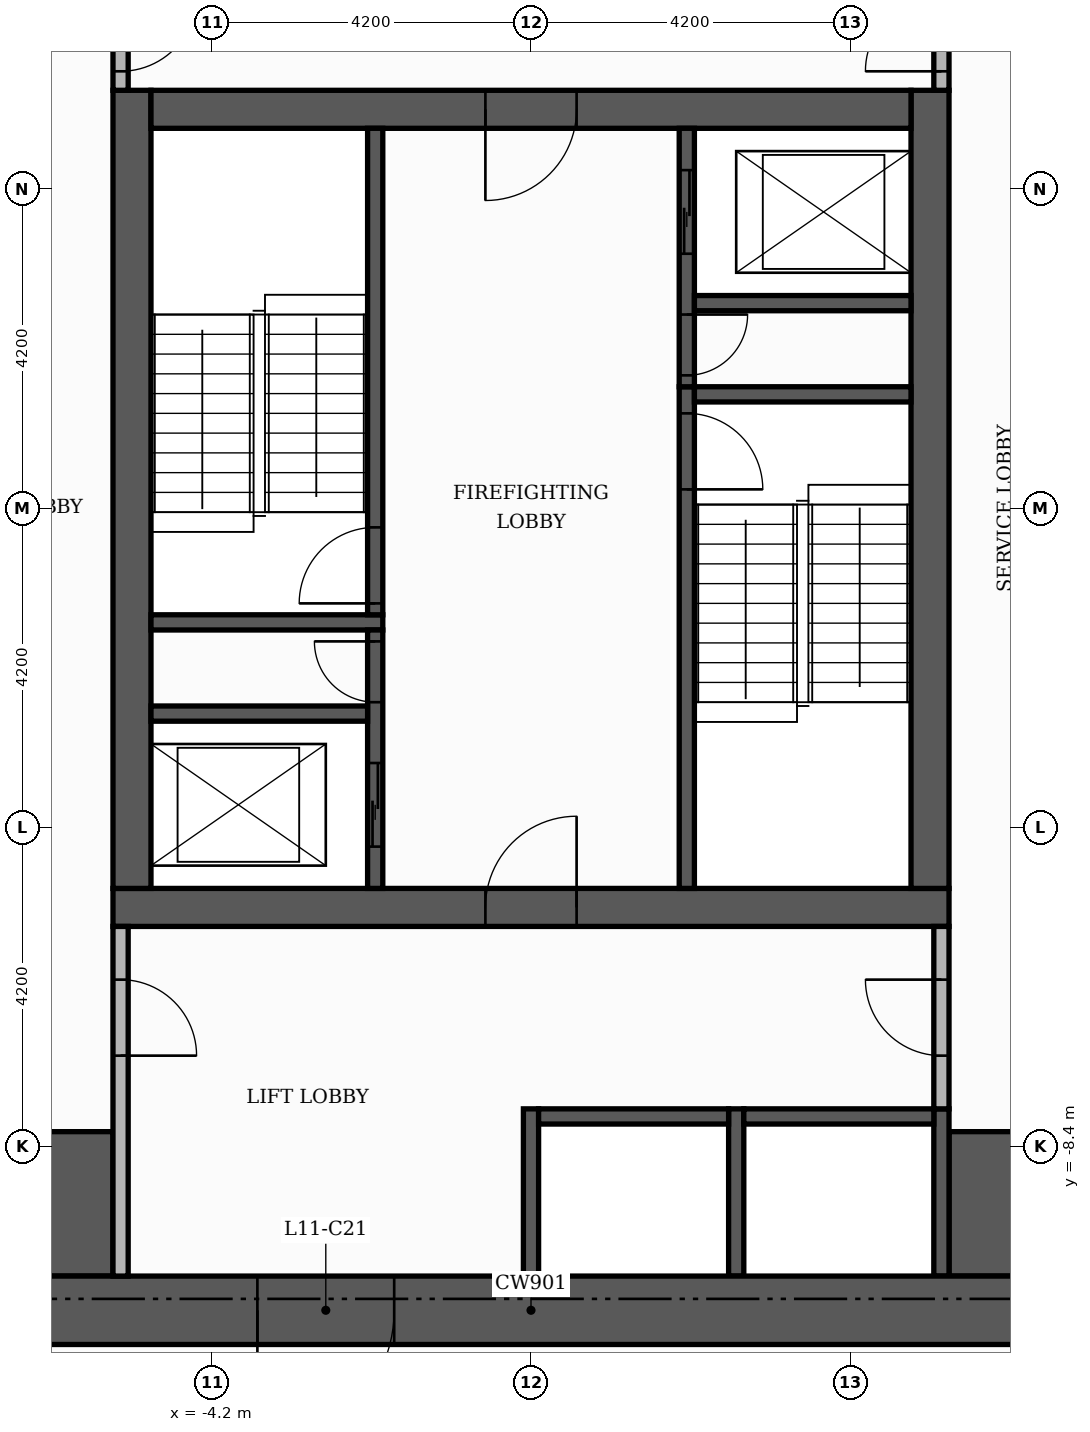
"""IFC4 building model, lengths in metres.
Left out: names, types, materials, properties, quantities, classifications, styles, units other than length and angle.
Written with IfcOpenShell. Run it as: python <this file> out.ifc"""

import sys

from ifc_helpers import new_model, si_unit, direction, frame, frame_2d, origin, place, context, subcontext, project, spatial, rectangle, extrude, element, fill, save


model = new_model("IFC4")
c1 = context("Model", 3, precision=1e-05, world=origin(), true_north=direction((0.0, 1.0)))
c2 = subcontext(c1, "Body", "Model", "MODEL_VIEW")
j1 = project(units=[si_unit("LENGTHUNIT", "METRE"), si_unit("PLANEANGLEUNIT", "RADIAN")], contexts=[c1])
p1 = place(None, origin())
s1 = spatial("IfcSite", under=j1, at=p1, CompositionType="ELEMENT")
p2 = place(p1, origin())
s2 = spatial("IfcBuilding", under=s1, at=p2, CompositionType="ELEMENT")
p3 = place(p2, frame((0.0, 0.0, 50.4)))
s3 = spatial("IfcBuildingStorey", under=s2, at=p3, CompositionType="ELEMENT", Elevation=50.4)
p4 = place(p3, frame((-5.5, -5.25, 0.0), z_axis=(0.0, 0.0, 1.0), x_axis=(1.0, 0.0, 0.0)))
e1 = element("IfcWall", 1, at=p4, inside=s3, PredefinedType="SHEAR", context=c2, shape_type="SweptSolid", body=[
    extrude(rectangle(XDim=11.0, YDim=0.5, at=frame_2d((5.5, 0.0))), origin(), (0.0, 0.0, 1.0), 3.48),
])
p5 = place(p4, frame((4.9, 0.0, 0.0)))
e2 = element("IfcOpeningElement", 2, at=p5, cuts=e1, PredefinedType="OPENING", context=c2, shape_type="SweptSolid", body=[
    extrude(rectangle(XDim=1.2, YDim=2.1, at=frame_2d((0.6, 1.05))), frame((0.0, 0.26, 0.0), z_axis=(0.0, -1.0, 0.0), x_axis=(1.0, 0.0, 0.0)), (0.0, 0.0, 1.0), 0.52),
])
for number, where, z_axis, x_axis in (
    (3, (-5.25, -5.0, 0.0), (0.0, 0.0, 1.0), (0.0, 1.0, 0.0)),
    (4, (5.25, -5.0, 0.0), (0.0, 0.0, 1.0), (0.0, 1.0, 0.0)),
):
    element("IfcWall", number, at=place(p3, frame(where, z_axis=z_axis, x_axis=x_axis)), inside=s3, PredefinedType="SHEAR", context=c2, shape_type="SweptSolid", body=[
        extrude(rectangle(XDim=10.5, YDim=0.5, at=frame_2d((5.25, 0.0))), origin(), (0.0, 0.0, 1.0), 3.48),
    ])
p6 = place(p3, frame((-5.0, 5.25, 0.0), z_axis=(0.0, 0.0, 1.0), x_axis=(1.0, 0.0, 0.0)))
e5 = element("IfcWall", 5, at=p6, inside=s3, PredefinedType="SHEAR", context=c2, shape_type="SweptSolid", body=[
    extrude(rectangle(XDim=10.0, YDim=0.5, at=frame_2d((5.0, 0.0))), origin(), (0.0, 0.0, 1.0), 3.48),
])
p7 = place(p6, frame((4.4, 0.0, 0.0)))
e6 = element("IfcOpeningElement", 6, at=p7, cuts=e5, PredefinedType="OPENING", context=c2, shape_type="SweptSolid", body=[
    extrude(rectangle(XDim=1.2, YDim=2.1, at=frame_2d((0.6, 1.05))), frame((0.0, 0.26, 0.0), z_axis=(0.0, -1.0, 0.0), x_axis=(1.0, 0.0, 0.0)), (0.0, 0.0, 1.0), 0.52),
])
for number, where, z_axis, x_axis in (
    (7, (-10.1, -9.15, 0.0), (0.0, 0.0, 1.0), (1.0, 0.0, 0.0)),
    (8, (5.5, -9.15, 0.0), (0.0, 0.0, 1.0), (1.0, 0.0, 0.0)),
):
    element("IfcWall", number, at=place(p3, frame(where, z_axis=z_axis, x_axis=x_axis)), inside=s3, PredefinedType="SHEAR", context=c2, shape_type="SweptSolid", body=[
        extrude(rectangle(XDim=4.6, YDim=1.9, at=frame_2d((2.3, 0.0))), origin(), (0.0, 0.0, 1.0), 3.48),
    ])
p8 = place(p3, frame((2.05, -5.0, 0.0), z_axis=(0.0, 0.0, 1.0), x_axis=(0.0, 1.0, 0.0)))
e9 = element("IfcWall", 9, at=p8, inside=s3, PredefinedType="SHEAR", context=c2, shape_type="SweptSolid", body=[
    extrude(rectangle(XDim=6.6, YDim=0.2, at=frame_2d((3.3, 0.0))), origin(), (0.0, 0.0, 1.0), 3.48),
])
p9 = place(p8, frame((5.25, 0.0, 0.0)))
e10 = element("IfcOpeningElement", 10, at=p9, cuts=e9, PredefinedType="OPENING", context=c2, shape_type="SweptSolid", body=[
    extrude(rectangle(XDim=1.0, YDim=2.1, at=frame_2d((0.5, 1.05))), frame((0.0, 0.11, 0.0), z_axis=(0.0, -1.0, 0.0), x_axis=(1.0, 0.0, 0.0)), (0.0, 0.0, 1.0), 0.22),
])
p10 = place(p3, frame((-5.0, -1.5, 0.0), z_axis=(0.0, 0.0, 1.0), x_axis=(1.0, 0.0, 0.0)))
e11 = element("IfcWall", 11, at=p10, inside=s3, PredefinedType="SHEAR", context=c2, shape_type="SweptSolid", body=[
    extrude(rectangle(XDim=3.05, YDim=0.2, at=frame_2d((1.525, 0.0))), origin(), (0.0, 0.0, 1.0), 3.48),
])
p11 = place(p3, frame((-2.05, -1.4, 0.0), z_axis=(0.0, 0.0, 1.0), x_axis=(0.0, 1.0, 0.0)))
e12 = element("IfcWall", 12, at=p11, inside=s3, PredefinedType="SHEAR", context=c2, shape_type="SweptSolid", body=[
    extrude(rectangle(XDim=6.4, YDim=0.2, at=frame_2d((3.2, 0.0))), origin(), (0.0, 0.0, 1.0), 3.48),
])
p12 = place(p11, frame((0.15, 0.0, 0.0)))
e13 = element("IfcOpeningElement", 13, at=p12, cuts=e12, PredefinedType="OPENING", context=c2, shape_type="SweptSolid", body=[
    extrude(rectangle(XDim=1.0, YDim=2.1, at=frame_2d((0.5, 1.05))), frame((0.0, 0.11, 0.0), z_axis=(0.0, -1.0, 0.0), x_axis=(1.0, 0.0, 0.0)), (0.0, 0.0, 1.0), 0.22),
])
p13 = place(p3, frame((2.15, 1.5, 0.0), z_axis=(0.0, 0.0, 1.0), x_axis=(1.0, 0.0, 0.0)))
e14 = element("IfcWall", 14, at=p13, inside=s3, PredefinedType="SHEAR", context=c2, shape_type="SweptSolid", body=[
    extrude(rectangle(XDim=2.85, YDim=0.2, at=frame_2d((1.425, 0.0))), origin(), (0.0, 0.0, 1.0), 3.48),
])
for number, where, z_axis, x_axis in (
    (15, (0.0, -10.1, 0.0), (0.0, 0.0, 1.0), (0.0, 1.0, 0.0)),
    (16, (2.7, -10.1, 0.0), (0.0, 0.0, 1.0), (0.0, 1.0, 0.0)),
    (17, (5.4, -10.1, 0.0), (0.0, 0.0, 1.0), (0.0, 1.0, 0.0)),
):
    element("IfcWall", number, at=place(p3, frame(where, z_axis=z_axis, x_axis=x_axis)), inside=s3, PredefinedType="SHEAR", context=c2, shape_type="SweptSolid", body=[
        extrude(rectangle(XDim=2.2, YDim=0.2, at=frame_2d((1.1, 0.0))), origin(), (0.0, 0.0, 1.0), 3.48),
    ])
for number, where, z_axis, x_axis in (
    (18, (0.1, -8.0, 0.0), (0.0, 0.0, 1.0), (1.0, 0.0, 0.0)),
    (19, (2.8, -8.0, 0.0), (0.0, 0.0, 1.0), (1.0, 0.0, 0.0)),
):
    element("IfcWall", number, at=place(p3, frame(where, z_axis=z_axis, x_axis=x_axis)), inside=s3, PredefinedType="SHEAR", context=c2, shape_type="SweptSolid", body=[
        extrude(rectangle(XDim=2.5, YDim=0.2, at=frame_2d((1.25, 0.0))), origin(), (0.0, 0.0, 1.0), 3.48),
    ])
p14 = place(p3, frame((-2.05, -5.0, 0.0), z_axis=(0.0, 0.0, 1.0), x_axis=(0.0, 1.0, 0.0)))
e20 = element("IfcWall", 20, at=p14, inside=s3, PredefinedType="SHEAR", context=c2, shape_type="SweptSolid", body=[
    extrude(rectangle(XDim=3.4, YDim=0.2, at=frame_2d((1.7, 0.0))), origin(), (0.0, 0.0, 1.0), 3.48),
])
p15 = place(p14, frame((0.55, 0.0, 0.0)))
e21 = element("IfcOpeningElement", 21, at=p15, cuts=e20, PredefinedType="OPENING", context=c2, shape_type="SweptSolid", body=[
    extrude(rectangle(XDim=1.1, YDim=2.1, at=frame_2d((0.55, 1.05))), frame((0.0, 0.11, 0.0), z_axis=(0.0, -1.0, 0.0), x_axis=(1.0, 0.0, 0.0)), (0.0, 0.0, 1.0), 0.22),
])
p16 = place(p14, frame((2.45, 0.0, 0.0)))
e22 = element("IfcOpeningElement", 22, at=p16, cuts=e20, PredefinedType="OPENING", context=c2, shape_type="SweptSolid", body=[
    extrude(rectangle(XDim=0.8, YDim=2.1, at=frame_2d((0.4, 1.05))), frame((0.0, 0.11, 0.0), z_axis=(0.0, -1.0, 0.0), x_axis=(1.0, 0.0, 0.0)), (0.0, 0.0, 1.0), 0.22),
])
p17 = place(p3, frame((-5.0, -2.7, 0.0), z_axis=(0.0, 0.0, 1.0), x_axis=(1.0, 0.0, 0.0)))
e23 = element("IfcWall", 23, at=p17, inside=s3, PredefinedType="SHEAR", context=c2, shape_type="SweptSolid", body=[
    extrude(rectangle(XDim=2.85, YDim=0.2, at=frame_2d((1.425, 0.0))), origin(), (0.0, 0.0, 1.0), 3.48),
])
p18 = place(p3, frame((2.05, 1.6, 0.0), z_axis=(0.0, 0.0, 1.0), x_axis=(0.0, 1.0, 0.0)))
e24 = element("IfcWall", 24, at=p18, inside=s3, PredefinedType="SHEAR", context=c2, shape_type="SweptSolid", body=[
    extrude(rectangle(XDim=3.4, YDim=0.2, at=frame_2d((1.7, 0.0))), origin(), (0.0, 0.0, 1.0), 3.48),
])
p19 = place(p18, frame((1.75, 0.0, 0.0)))
e25 = element("IfcOpeningElement", 25, at=p19, cuts=e24, PredefinedType="OPENING", context=c2, shape_type="SweptSolid", body=[
    extrude(rectangle(XDim=1.1, YDim=2.1, at=frame_2d((0.55, 1.05))), frame((0.0, 0.11, 0.0), z_axis=(0.0, -1.0, 0.0), x_axis=(1.0, 0.0, 0.0)), (0.0, 0.0, 1.0), 0.22),
])
p20 = place(p18, frame((0.15, 0.0, 0.0)))
e26 = element("IfcOpeningElement", 26, at=p20, cuts=e24, PredefinedType="OPENING", context=c2, shape_type="SweptSolid", body=[
    extrude(rectangle(XDim=0.8, YDim=2.1, at=frame_2d((0.4, 1.05))), frame((0.0, 0.11, 0.0), z_axis=(0.0, -1.0, 0.0), x_axis=(1.0, 0.0, 0.0)), (0.0, 0.0, 1.0), 0.22),
])
p21 = place(p3, frame((2.15, 2.7, 0.0), z_axis=(0.0, 0.0, 1.0), x_axis=(1.0, 0.0, 0.0)))
e27 = element("IfcWall", 27, at=p21, inside=s3, PredefinedType="SHEAR", context=c2, shape_type="SweptSolid", body=[
    extrude(rectangle(XDim=2.85, YDim=0.2, at=frame_2d((1.425, 0.0))), origin(), (0.0, 0.0, 1.0), 3.48),
])
p22 = place(p3, frame((-11.0, -10.55, 0.0), z_axis=(0.0, 0.0, 1.0), x_axis=(1.0, 0.0, 0.0)))
e28 = element("IfcWall", 28, at=p22, inside=s3, PredefinedType="SHEAR", context=c2, shape_type="SweptSolid", body=[
    extrude(rectangle(XDim=22.0, YDim=0.9, at=frame_2d((11.0, 0.0))), origin(), (0.0, 0.0, 1.0), 3.48),
])
p23 = place(p22, frame((7.4, 0.0, 0.0)))
e29 = element("IfcOpeningElement", 29, at=p23, cuts=e28, PredefinedType="OPENING", context=c2, shape_type="SweptSolid", body=[
    extrude(rectangle(XDim=1.8, YDim=2.2, at=frame_2d((0.9, 1.1))), frame((0.0, 0.46, 0.0), z_axis=(0.0, -1.0, 0.0), x_axis=(1.0, 0.0, 0.0)), (0.0, 0.0, 1.0), 0.92),
])
p24 = place(p3, frame((-5.4, -10.1, 0.0), z_axis=(0.0, 0.0, 1.0), x_axis=(0.0, 1.0, 0.0)))
e30 = element("IfcWall", 30, at=p24, inside=s3, PredefinedType="PARTITIONING", context=c2, shape_type="SweptSolid", body=[
    extrude(rectangle(XDim=4.6, YDim=0.2, at=frame_2d((2.3, 0.0))), origin(), (0.0, 0.0, 1.0), 3.48),
])
p25 = place(p24, frame((2.9, 0.0, 0.0)))
e31 = element("IfcOpeningElement", 31, at=p25, cuts=e30, PredefinedType="OPENING", context=c2, shape_type="SweptSolid", body=[
    extrude(rectangle(XDim=1.0, YDim=2.1, at=frame_2d((0.5, 1.05))), frame((0.0, 0.11, 0.0), z_axis=(0.0, -1.0, 0.0), x_axis=(1.0, 0.0, 0.0)), (0.0, 0.0, 1.0), 0.22),
])
p26 = place(p3, frame((5.4, -7.9, 0.0), z_axis=(0.0, 0.0, 1.0), x_axis=(0.0, 1.0, 0.0)))
e32 = element("IfcWall", 32, at=p26, inside=s3, PredefinedType="PARTITIONING", context=c2, shape_type="SweptSolid", body=[
    extrude(rectangle(XDim=2.4, YDim=0.2, at=frame_2d((1.2, 0.0))), origin(), (0.0, 0.0, 1.0), 3.48),
])
p27 = place(p26, frame((0.7, 0.0, 0.0)))
e33 = element("IfcOpeningElement", 33, at=p27, cuts=e32, PredefinedType="OPENING", context=c2, shape_type="SweptSolid", body=[
    extrude(rectangle(XDim=1.0, YDim=2.1, at=frame_2d((0.5, 1.05))), frame((0.0, 0.11, 0.0), z_axis=(0.0, -1.0, 0.0), x_axis=(1.0, 0.0, 0.0)), (0.0, 0.0, 1.0), 0.22),
])
p28 = place(p3, frame((-5.4, 5.5, 0.0), z_axis=(0.0, 0.0, 1.0), x_axis=(0.0, 1.0, 0.0)))
e34 = element("IfcWall", 34, at=p28, inside=s3, PredefinedType="PARTITIONING", context=c2, shape_type="SweptSolid", body=[
    extrude(rectangle(XDim=1.55, YDim=0.2, at=frame_2d((0.775, 0.0))), origin(), (0.0, 0.0, 1.0), 3.48),
])
p29 = place(p28, frame((0.25, 0.0, 0.0)))
e35 = element("IfcOpeningElement", 35, at=p29, cuts=e34, PredefinedType="OPENING", context=c2, shape_type="SweptSolid", body=[
    extrude(rectangle(XDim=1.0, YDim=2.1, at=frame_2d((0.5, 1.05))), frame((0.0, 0.11, 0.0), z_axis=(0.0, -1.0, 0.0), x_axis=(1.0, 0.0, 0.0)), (0.0, 0.0, 1.0), 0.22),
])
p30 = place(p3, frame((5.4, 5.5, 0.0), z_axis=(0.0, 0.0, 1.0), x_axis=(0.0, 1.0, 0.0)))
e36 = element("IfcWall", 36, at=p30, inside=s3, PredefinedType="PARTITIONING", context=c2, shape_type="SweptSolid", body=[
    extrude(rectangle(XDim=4.6, YDim=0.2, at=frame_2d((2.3, 0.0))), origin(), (0.0, 0.0, 1.0), 3.48),
])
p31 = place(p30, frame((0.25, 0.0, 0.0)))
e37 = element("IfcOpeningElement", 37, at=p31, cuts=e36, PredefinedType="OPENING", context=c2, shape_type="SweptSolid", body=[
    extrude(rectangle(XDim=1.0, YDim=2.1, at=frame_2d((0.5, 1.05))), frame((0.0, 0.11, 0.0), z_axis=(0.0, -1.0, 0.0), x_axis=(1.0, 0.0, 0.0)), (0.0, 0.0, 1.0), 0.22),
])
p32 = place(p19, origin())
e38 = element("IfcDoor", 38, at=p32, inside=s3, OperationType="SLIDING_TO_LEFT", PredefinedType="DOOR", context=c2, shape_type="SweptSolid", body=[
    extrude(rectangle(XDim=1.1, YDim=2.1, at=frame_2d((0.55, 1.05))), frame((0.0, 0.025, 0.0), z_axis=(0.0, -1.0, 0.0), x_axis=(1.0, 0.0, 0.0)), (0.0, 0.0, 1.0), 0.05),
])
fill(e25, e38)
p33 = place(p15, origin())
e39 = element("IfcDoor", 39, at=p33, inside=s3, OperationType="SLIDING_TO_LEFT", PredefinedType="DOOR", context=c2, shape_type="SweptSolid", body=[
    extrude(rectangle(XDim=1.1, YDim=2.1, at=frame_2d((0.55, 1.05))), frame((0.0, 0.025, 0.0), z_axis=(0.0, -1.0, 0.0), x_axis=(1.0, 0.0, 0.0)), (0.0, 0.0, 1.0), 0.05),
])
fill(e21, e39)
p34 = place(p12, origin())
e40 = element("IfcDoor", 40, at=p34, inside=s3, OperationType="SINGLE_SWING_LEFT", PredefinedType="DOOR", context=c2, shape_type="SweptSolid", body=[
    extrude(rectangle(XDim=1.0, YDim=2.1, at=frame_2d((0.5, 1.05))), frame((0.0, 0.025, 0.0), z_axis=(0.0, -1.0, 0.0), x_axis=(1.0, 0.0, 0.0)), (0.0, 0.0, 1.0), 0.05),
])
fill(e13, e40)
p35 = place(p9, frame((1.0, 0.0, 0.0), z_axis=(0.0, 0.0, 1.0), x_axis=(-1.0, 0.0, 0.0)))
e41 = element("IfcDoor", 41, at=p35, inside=s3, OperationType="SINGLE_SWING_LEFT", PredefinedType="DOOR", context=c2, shape_type="SweptSolid", body=[
    extrude(rectangle(XDim=1.0, YDim=2.1, at=frame_2d((0.5, 1.05))), frame((0.0, 0.025, 0.0), z_axis=(0.0, -1.0, 0.0), x_axis=(1.0, 0.0, 0.0)), (0.0, 0.0, 1.0), 0.05),
])
fill(e10, e41)
p36 = place(p20, frame((0.8, 0.0, 0.0), z_axis=(0.0, 0.0, 1.0), x_axis=(-1.0, 0.0, 0.0)))
e42 = element("IfcDoor", 42, at=p36, inside=s3, OperationType="SINGLE_SWING_RIGHT", PredefinedType="DOOR", context=c2, shape_type="SweptSolid", body=[
    extrude(rectangle(XDim=0.8, YDim=2.1, at=frame_2d((0.4, 1.05))), frame((0.0, 0.025, 0.0), z_axis=(0.0, -1.0, 0.0), x_axis=(1.0, 0.0, 0.0)), (0.0, 0.0, 1.0), 0.05),
])
fill(e26, e42)
p37 = place(p16, origin())
e43 = element("IfcDoor", 43, at=p37, inside=s3, OperationType="SINGLE_SWING_RIGHT", PredefinedType="DOOR", context=c2, shape_type="SweptSolid", body=[
    extrude(rectangle(XDim=0.8, YDim=2.1, at=frame_2d((0.4, 1.05))), frame((0.0, 0.025, 0.0), z_axis=(0.0, -1.0, 0.0), x_axis=(1.0, 0.0, 0.0)), (0.0, 0.0, 1.0), 0.05),
])
fill(e22, e43)
p38 = place(p7, frame((1.2, 0.0, 0.0), z_axis=(0.0, 0.0, 1.0), x_axis=(-1.0, 0.0, 0.0)))
e44 = element("IfcDoor", 44, at=p38, inside=s3, OperationType="SINGLE_SWING_LEFT", PredefinedType="DOOR", context=c2, shape_type="SweptSolid", body=[
    extrude(rectangle(XDim=1.2, YDim=2.1, at=frame_2d((0.6, 1.05))), frame((0.0, 0.025, 0.0), z_axis=(0.0, -1.0, 0.0), x_axis=(1.0, 0.0, 0.0)), (0.0, 0.0, 1.0), 0.05),
])
fill(e6, e44)
p39 = place(p5, origin())
e45 = element("IfcDoor", 45, at=p39, inside=s3, OperationType="SINGLE_SWING_RIGHT", PredefinedType="DOOR", context=c2, shape_type="SweptSolid", body=[
    extrude(rectangle(XDim=1.2, YDim=2.1, at=frame_2d((0.6, 1.05))), frame((0.0, 0.025, 0.0), z_axis=(0.0, -1.0, 0.0), x_axis=(1.0, 0.0, 0.0)), (0.0, 0.0, 1.0), 0.05),
])
fill(e2, e45)
p40 = place(p29, frame((1.0, 0.0, 0.0), z_axis=(0.0, 0.0, 1.0), x_axis=(-1.0, 0.0, 0.0)))
e46 = element("IfcDoor", 46, at=p40, inside=s3, OperationType="SINGLE_SWING_RIGHT", PredefinedType="DOOR", context=c2, shape_type="SweptSolid", body=[
    extrude(rectangle(XDim=1.0, YDim=2.1, at=frame_2d((0.5, 1.05))), frame((0.0, 0.025, 0.0), z_axis=(0.0, -1.0, 0.0), x_axis=(1.0, 0.0, 0.0)), (0.0, 0.0, 1.0), 0.05),
])
fill(e35, e46)
p41 = place(p31, origin())
e47 = element("IfcDoor", 47, at=p41, inside=s3, OperationType="SINGLE_SWING_LEFT", PredefinedType="DOOR", context=c2, shape_type="SweptSolid", body=[
    extrude(rectangle(XDim=1.0, YDim=2.1, at=frame_2d((0.5, 1.05))), frame((0.0, 0.025, 0.0), z_axis=(0.0, -1.0, 0.0), x_axis=(1.0, 0.0, 0.0)), (0.0, 0.0, 1.0), 0.05),
])
fill(e37, e47)
p42 = place(p25, frame((1.0, 0.0, 0.0), z_axis=(0.0, 0.0, 1.0), x_axis=(-1.0, 0.0, 0.0)))
e48 = element("IfcDoor", 48, at=p42, inside=s3, OperationType="SINGLE_SWING_LEFT", PredefinedType="DOOR", context=c2, shape_type="SweptSolid", body=[
    extrude(rectangle(XDim=1.0, YDim=2.1, at=frame_2d((0.5, 1.05))), frame((0.0, 0.025, 0.0), z_axis=(0.0, -1.0, 0.0), x_axis=(1.0, 0.0, 0.0)), (0.0, 0.0, 1.0), 0.05),
])
fill(e31, e48)
p43 = place(p27, origin())
e49 = element("IfcDoor", 49, at=p43, inside=s3, OperationType="SINGLE_SWING_RIGHT", PredefinedType="DOOR", context=c2, shape_type="SweptSolid", body=[
    extrude(rectangle(XDim=1.0, YDim=2.1, at=frame_2d((0.5, 1.05))), frame((0.0, 0.025, 0.0), z_axis=(0.0, -1.0, 0.0), x_axis=(1.0, 0.0, 0.0)), (0.0, 0.0, 1.0), 0.05),
])
fill(e33, e49)
p44 = place(p23, frame((1.8, 0.0, 0.0), z_axis=(0.0, 0.0, 1.0), x_axis=(-1.0, 0.0, 0.0)))
e50 = element("IfcDoor", 50, at=p44, inside=s3, OperationType="DOUBLE_DOOR_SINGLE_SWING", PredefinedType="DOOR", context=c2, shape_type="SweptSolid", body=[
    extrude(rectangle(XDim=1.8, YDim=2.2, at=frame_2d((0.9, 1.1))), frame((0.0, 0.025, 0.0), z_axis=(0.0, -1.0, 0.0), x_axis=(1.0, 0.0, 0.0)), (0.0, 0.0, 1.0), 0.05),
])
fill(e29, e50)
save(model, sys.argv[1])
